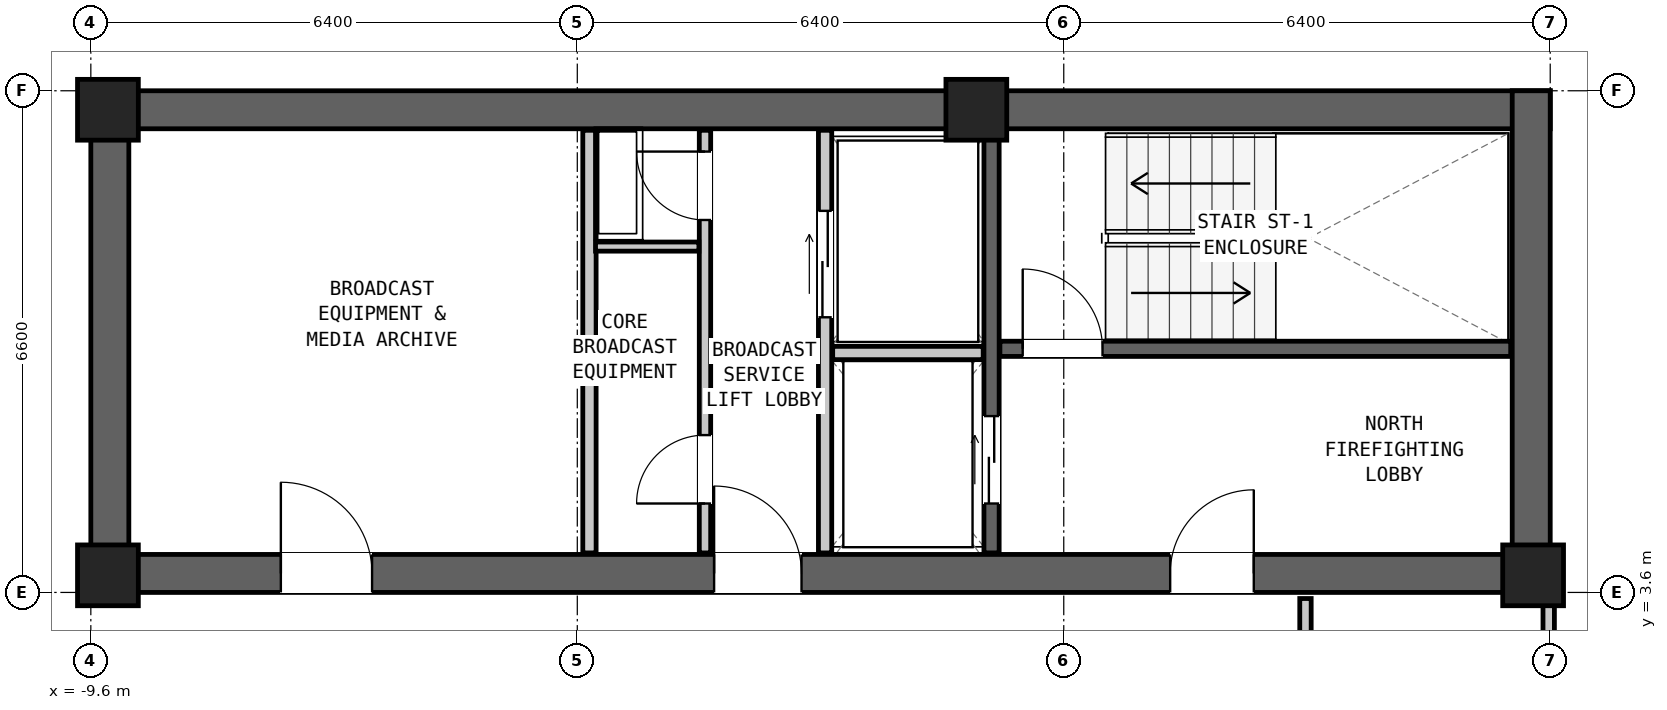
"""IFC4 building model, lengths in metres.
Left out: names, types, materials, properties, quantities, classifications, styles, units other than length and angle.
Written with IfcOpenShell. Run it as: python <this file> out.ifc"""

import sys

from ifc_helpers import new_model, si_unit, direction, frame, frame_2d, origin, origin_2d, place, context, subcontext, project, spatial, rectangle, extrude, element, fill, save


model = new_model("IFC4")
c1 = context("Model", 3, precision=1e-05, world=origin(), true_north=direction((0.0, 1.0)))
c2 = subcontext(c1, "Body", "Model", "MODEL_VIEW")
j1 = project(units=[si_unit("LENGTHUNIT", "METRE"), si_unit("PLANEANGLEUNIT", "RADIAN")], contexts=[c1])
p1 = place(None, origin())
s1 = spatial("IfcSite", under=j1, at=p1, CompositionType="ELEMENT")
p2 = place(p1, origin())
s2 = spatial("IfcBuilding", under=s1, at=p2, CompositionType="ELEMENT")
p3 = place(p2, frame((0.0, 0.0, 165.3)))
s3 = spatial("IfcBuildingStorey", under=s2, at=p3, CompositionType="ELEMENT", Elevation=165.3)
p4 = place(p3, frame((-9.6, 9.95, 0.0), z_axis=(0.0, 0.0, 1.0), x_axis=(1.0, 0.0, 0.0)))
e1 = element("IfcWall", 1, at=p4, inside=s3, PredefinedType="SHEAR", context=c2, shape_type="SweptSolid", body=[
    extrude(rectangle(XDim=19.2, YDim=0.5, at=frame_2d((9.6, 0.0))), origin(), (0.0, 0.0, 1.0), 3.05),
])
p5 = place(p3, frame((-9.6, 3.85, 0.0), z_axis=(0.0, 0.0, 1.0), x_axis=(1.0, 0.0, 0.0)))
e2 = element("IfcWall", 2, at=p5, inside=s3, PredefinedType="SHEAR", context=c2, shape_type="SweptSolid", body=[
    extrude(rectangle(XDim=19.2, YDim=0.5, at=frame_2d((9.6, 0.0))), origin(), (0.0, 0.0, 1.0), 3.05),
])
p6 = place(p5, frame((14.2, 0.0, 0.0)))
e3 = element("IfcOpeningElement", 3, at=p6, cuts=e2, PredefinedType="OPENING", context=c2, shape_type="SweptSolid", body=[
    extrude(rectangle(XDim=1.1, YDim=2.08, at=frame_2d((0.55, 1.04))), frame((0.0, 0.262, 0.0), z_axis=(0.0, -1.0, 0.0), x_axis=(1.0, 0.0, 0.0)), (0.0, 0.0, 1.0), 0.524),
])
p7 = place(p5, frame((8.2, 0.0, 0.0)))
e4 = element("IfcOpeningElement", 4, at=p7, cuts=e2, PredefinedType="OPENING", context=c2, shape_type="SweptSolid", body=[
    extrude(rectangle(XDim=1.15, YDim=2.1, at=frame_2d((0.575, 1.05))), frame((0.0, 0.262, 0.0), z_axis=(0.0, -1.0, 0.0), x_axis=(1.0, 0.0, 0.0)), (0.0, 0.0, 1.0), 0.524),
])
p8 = place(p5, frame((2.5, 0.0, 0.0)))
e5 = element("IfcOpeningElement", 5, at=p8, cuts=e2, PredefinedType="OPENING", context=c2, shape_type="SweptSolid", body=[
    extrude(rectangle(XDim=1.2, YDim=2.1, at=frame_2d((0.6, 1.05))), frame((0.0, 0.262, 0.0), z_axis=(0.0, -1.0, 0.0), x_axis=(1.0, 0.0, 0.0)), (0.0, 0.0, 1.0), 0.524),
])
for number, where, z_axis, x_axis in (
    (6, (-9.35, 3.6, 0.0), (0.0, 0.0, 1.0), (0.0, 1.0, 0.0)),
    (7, (9.35, 3.6, 0.0), (0.0, 0.0, 1.0), (0.0, 1.0, 0.0)),
):
    element("IfcWall", number, at=place(p3, frame(where, z_axis=z_axis, x_axis=x_axis)), inside=s3, PredefinedType="SHEAR", context=c2, shape_type="SweptSolid", body=[
        extrude(rectangle(XDim=6.6, YDim=0.5, at=frame_2d((3.3, 0.0))), origin(), (0.0, 0.0, 1.0), 3.05),
    ])
for number, where, z_axis, x_axis in (
    (8, (-9.375, 9.95, 0.0), (0.0, 0.0, 1.0), (1.0, 0.0, 0.0)),
    (9, (2.05, 9.95, 0.0), (0.0, 0.0, 1.0), (1.0, 0.0, 0.0)),
    (10, (-9.375, 3.825, 0.0), (0.0, 0.0, 1.0), (1.0, 0.0, 0.0)),
    (11, (9.375, 3.825, 0.0), (0.0, 0.0, 1.0), (1.0, 0.0, 0.0)),
):
    element("IfcColumn", number, at=place(p3, frame(where, z_axis=z_axis, x_axis=x_axis)), inside=s3, PredefinedType="COLUMN", context=c2, shape_type="SweptSolid", body=[
        extrude(rectangle(XDim=0.8, YDim=0.8, at=origin_2d()), origin(), (0.0, 0.0, 1.0), 3.05),
    ])
p9 = place(p3, frame((2.36, 6.805, 0.0), z_axis=(0.0, 0.0, 1.0), x_axis=(1.0, 0.0, 0.0)))
e12 = element("IfcWall", 12, at=p9, inside=s3, PredefinedType="SHEAR", context=c2, shape_type="SweptSolid", body=[
    extrude(rectangle(XDim=6.72, YDim=0.2, at=frame_2d((3.36, 0.0))), origin(), (0.0, 0.0, 1.0), 2.83),
])
p10 = place(p9, frame((0.3, 0.0, 0.0)))
e13 = element("IfcOpeningElement", 13, at=p10, cuts=e12, PredefinedType="OPENING", context=c2, shape_type="SweptSolid", body=[
    extrude(rectangle(XDim=1.05, YDim=2.08, at=frame_2d((0.525, 1.04))), frame((0.0, 0.112, 0.0), z_axis=(0.0, -1.0, 0.0), x_axis=(1.0, 0.0, 0.0)), (0.0, 0.0, 1.0), 0.224),
])
p11 = place(p3, frame((2.25, 4.12, 0.0), z_axis=(0.0, 0.0, 1.0), x_axis=(0.0, 1.0, 0.0)))
e14 = element("IfcWall", 14, at=p11, inside=s3, PredefinedType="SHEAR", context=c2, shape_type="SweptSolid", body=[
    extrude(rectangle(XDim=5.56, YDim=0.2, at=frame_2d((2.78, 0.0))), origin(), (0.0, 0.0, 1.0), 2.83),
])
p12 = place(p11, frame((0.65, 0.0, 0.0)))
e15 = element("IfcOpeningElement", 15, at=p12, cuts=e14, PredefinedType="OPENING", context=c2, shape_type="SweptSolid", body=[
    extrude(rectangle(XDim=1.15, YDim=2.08, at=frame_2d((0.575, 1.04))), frame((0.0, 0.112, 0.0), z_axis=(0.0, -1.0, 0.0), x_axis=(1.0, 0.0, 0.0)), (0.0, 0.0, 1.0), 0.224),
])
p13 = place(p3, frame((0.06, 4.12, 0.0), z_axis=(0.0, 0.0, 1.0), x_axis=(0.0, 1.0, 0.0)))
e16 = element("IfcWall", 16, at=p13, inside=s3, PredefinedType="PARTITIONING", context=c2, shape_type="SweptSolid", body=[
    extrude(rectangle(XDim=5.56, YDim=0.175, at=frame_2d((2.78, 0.0))), origin(), (0.0, 0.0, 1.0), 2.83),
])
p14 = place(p13, frame((3.1, 0.0, 0.0)))
e17 = element("IfcOpeningElement", 17, at=p14, cuts=e16, PredefinedType="OPENING", context=c2, shape_type="SweptSolid", body=[
    extrude(rectangle(XDim=1.4, YDim=2.12, at=frame_2d((0.7, 1.06))), frame((0.0, 0.1, 0.0), z_axis=(0.0, -1.0, 0.0), x_axis=(1.0, 0.0, 0.0)), (0.0, 0.0, 1.0), 0.199),
])
p15 = place(p3, frame((0.16, 6.75, 0.0), z_axis=(0.0, 0.0, 1.0), x_axis=(1.0, 0.0, 0.0)))
e18 = element("IfcWall", 18, at=p15, inside=s3, PredefinedType="PARTITIONING", context=c2, shape_type="SweptSolid", body=[
    extrude(rectangle(XDim=1.98, YDim=0.175, at=frame_2d((0.99, 0.0))), origin(), (0.0, 0.0, 1.0), 2.83),
])
p16 = place(p3, frame((-3.04, 4.12, 0.0), z_axis=(0.0, 0.0, 1.0), x_axis=(0.0, 1.0, 0.0)))
e19 = element("IfcWall", 19, at=p16, inside=s3, PredefinedType="PARTITIONING", context=c2, shape_type="SweptSolid", body=[
    extrude(rectangle(XDim=5.56, YDim=0.175, at=frame_2d((2.78, 0.0))), origin(), (0.0, 0.0, 1.0), 2.83),
])
p17 = place(p3, frame((-1.52, 4.12, 0.0), z_axis=(0.0, 0.0, 1.0), x_axis=(0.0, 1.0, 0.0)))
e20 = element("IfcWall", 20, at=p17, inside=s3, PredefinedType="PARTITIONING", context=c2, shape_type="SweptSolid", body=[
    extrude(rectangle(XDim=5.56, YDim=0.15, at=frame_2d((2.78, 0.0))), origin(), (0.0, 0.0, 1.0), 2.83),
])
p18 = place(p17, frame((4.38, 0.0, 0.0)))
e21 = element("IfcOpeningElement", 21, at=p18, cuts=e20, PredefinedType="OPENING", context=c2, shape_type="SweptSolid", body=[
    extrude(rectangle(XDim=0.9, YDim=2.05, at=frame_2d((0.45, 1.025))), frame((0.0, 0.087, 0.0), z_axis=(0.0, -1.0, 0.0), x_axis=(1.0, 0.0, 0.0)), (0.0, 0.0, 1.0), 0.174),
])
p19 = place(p17, frame((0.65, 0.0, 0.0)))
e22 = element("IfcOpeningElement", 22, at=p19, cuts=e20, PredefinedType="OPENING", context=c2, shape_type="SweptSolid", body=[
    extrude(rectangle(XDim=0.9, YDim=2.05, at=frame_2d((0.45, 1.025))), frame((0.0, 0.087, 0.0), z_axis=(0.0, -1.0, 0.0), x_axis=(1.0, 0.0, 0.0)), (0.0, 0.0, 1.0), 0.174),
])
p20 = place(p3, frame((-2.96, 8.15, 0.0), z_axis=(0.0, 0.0, 1.0), x_axis=(1.0, 0.0, 0.0)))
e23 = element("IfcWall", 23, at=p20, inside=s3, PredefinedType="PARTITIONING", context=c2, shape_type="SweptSolid", body=[
    extrude(rectangle(XDim=1.36, YDim=0.12, at=frame_2d((0.68, 0.0))), origin(), (0.0, 0.0, 1.0), 2.83),
])
p21 = place(p3, frame((6.38, -2.32, 0.0), z_axis=(0.0, 0.0, 1.0), x_axis=(0.0, 1.0, 0.0)))
e24 = element("IfcWall", 24, at=p21, inside=s3, PredefinedType="PARTITIONING", context=c2, shape_type="SweptSolid", body=[
    extrude(rectangle(XDim=5.84, YDim=0.15, at=frame_2d((2.92, 0.0))), origin(), (0.0, 0.0, 1.0), 2.198),
])
p22 = place(p3, frame((9.58, -2.32, 0.0), z_axis=(0.0, 0.0, 1.0), x_axis=(0.0, 1.0, 0.0)))
e25 = element("IfcWall", 25, at=p22, inside=s3, PredefinedType="PARTITIONING", context=c2, shape_type="SweptSolid", body=[
    extrude(rectangle(XDim=5.84, YDim=0.15, at=frame_2d((2.92, 0.0))), origin(), (0.0, 0.0, 1.0), 2.198),
])
p23 = place(p22, frame((2.445, 0.0, 0.0)))
e26 = element("IfcOpeningElement", 26, at=p23, cuts=e25, PredefinedType="OPENING", context=c2, shape_type="SweptSolid", body=[
    extrude(rectangle(XDim=0.95, YDim=2.1, at=frame_2d((0.475, 1.05))), frame((0.0, 0.087, 0.0), z_axis=(0.0, -1.0, 0.0), x_axis=(1.0, 0.0, 0.0)), (0.0, 0.0, 1.0), 0.174),
])
p24 = place(p10, origin())
e27 = element("IfcDoor", 27, at=p24, inside=s3, OperationType="SINGLE_SWING_LEFT", PredefinedType="DOOR", context=c2, shape_type="SweptSolid", body=[
    extrude(rectangle(XDim=1.05, YDim=2.08, at=frame_2d((0.525, 1.04))), frame((0.0, 0.025, 0.0), z_axis=(0.0, -1.0, 0.0), x_axis=(1.0, 0.0, 0.0)), (0.0, 0.0, 1.0), 0.05),
])
fill(e13, e27)
p25 = place(p6, origin())
e28 = element("IfcDoor", 28, at=p25, inside=s3, OperationType="SINGLE_SWING_RIGHT", PredefinedType="DOOR", context=c2, shape_type="SweptSolid", body=[
    extrude(rectangle(XDim=1.1, YDim=2.08, at=frame_2d((0.55, 1.04))), frame((0.0, 0.025, 0.0), z_axis=(0.0, -1.0, 0.0), x_axis=(1.0, 0.0, 0.0)), (0.0, 0.0, 1.0), 0.05),
])
fill(e3, e28)
p26 = place(p12, origin())
e29 = element("IfcDoor", 29, at=p26, inside=s3, OperationType="DOUBLE_DOOR_SLIDING", PredefinedType="DOOR", context=c2, shape_type="SweptSolid", body=[
    extrude(rectangle(XDim=1.15, YDim=2.08, at=frame_2d((0.575, 1.04))), frame((0.0, 0.025, 0.0), z_axis=(0.0, -1.0, 0.0), x_axis=(1.0, 0.0, 0.0)), (0.0, 0.0, 1.0), 0.05),
])
fill(e15, e29)
p27 = place(p14, origin())
e30 = element("IfcDoor", 30, at=p27, inside=s3, OperationType="DOUBLE_DOOR_SLIDING", PredefinedType="DOOR", context=c2, shape_type="SweptSolid", body=[
    extrude(rectangle(XDim=1.4, YDim=2.12, at=frame_2d((0.7, 1.06))), frame((0.0, 0.025, 0.0), z_axis=(0.0, -1.0, 0.0), x_axis=(1.0, 0.0, 0.0)), (0.0, 0.0, 1.0), 0.05),
])
fill(e17, e30)
p28 = place(p7, origin())
e31 = element("IfcDoor", 31, at=p28, inside=s3, OperationType="SINGLE_SWING_LEFT", PredefinedType="DOOR", context=c2, shape_type="SweptSolid", body=[
    extrude(rectangle(XDim=1.15, YDim=2.1, at=frame_2d((0.575, 1.05))), frame((0.0, 0.025, 0.0), z_axis=(0.0, -1.0, 0.0), x_axis=(1.0, 0.0, 0.0)), (0.0, 0.0, 1.0), 0.05),
])
fill(e4, e31)
p29 = place(p18, origin())
e32 = element("IfcDoor", 32, at=p29, inside=s3, OperationType="SINGLE_SWING_RIGHT", PredefinedType="DOOR", context=c2, shape_type="SweptSolid", body=[
    extrude(rectangle(XDim=0.9, YDim=2.05, at=frame_2d((0.45, 1.025))), frame((0.0, 0.025, 0.0), z_axis=(0.0, -1.0, 0.0), x_axis=(1.0, 0.0, 0.0)), (0.0, 0.0, 1.0), 0.05),
])
fill(e21, e32)
p30 = place(p19, origin())
e33 = element("IfcDoor", 33, at=p30, inside=s3, OperationType="SINGLE_SWING_LEFT", PredefinedType="DOOR", context=c2, shape_type="SweptSolid", body=[
    extrude(rectangle(XDim=0.9, YDim=2.05, at=frame_2d((0.45, 1.025))), frame((0.0, 0.025, 0.0), z_axis=(0.0, -1.0, 0.0), x_axis=(1.0, 0.0, 0.0)), (0.0, 0.0, 1.0), 0.05),
])
fill(e22, e33)
p31 = place(p8, origin())
e34 = element("IfcDoor", 34, at=p31, inside=s3, OperationType="SINGLE_SWING_LEFT", PredefinedType="DOOR", context=c2, shape_type="SweptSolid", body=[
    extrude(rectangle(XDim=1.2, YDim=2.1, at=frame_2d((0.6, 1.05))), frame((0.0, 0.025, 0.0), z_axis=(0.0, -1.0, 0.0), x_axis=(1.0, 0.0, 0.0)), (0.0, 0.0, 1.0), 0.05),
])
fill(e5, e34)
save(model, sys.argv[1])
